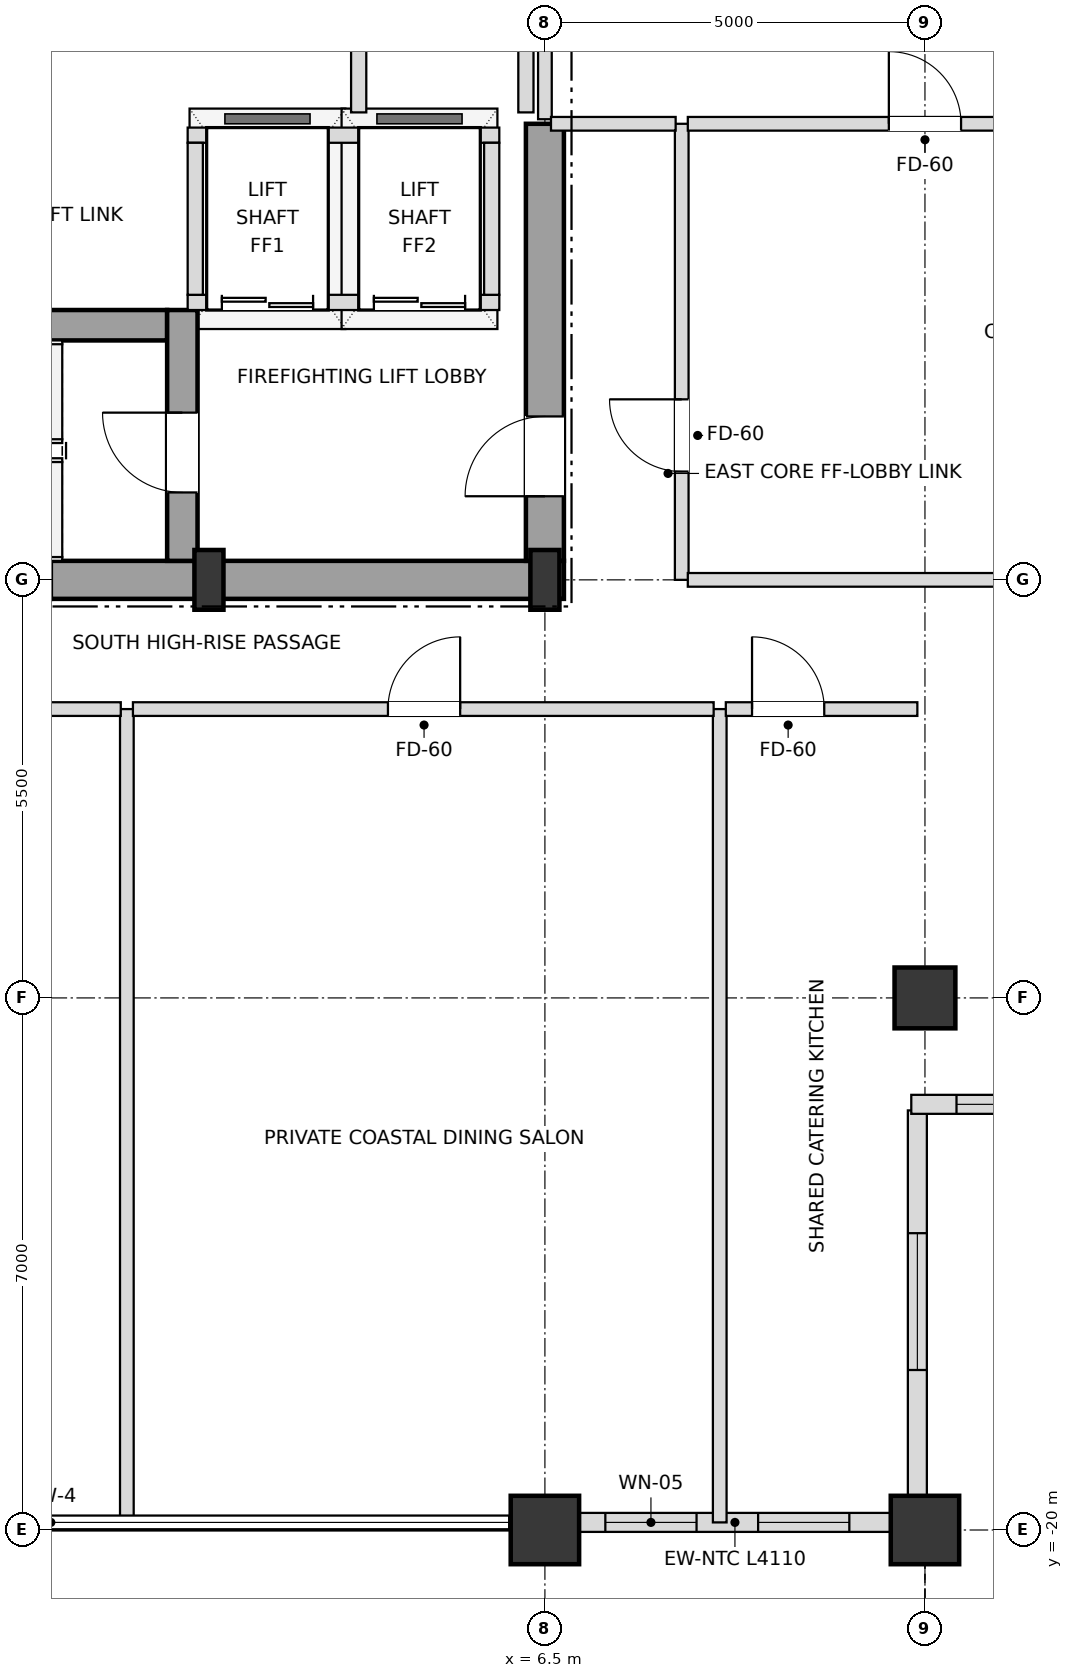
"""IFC4 building model, lengths in metres.
Left out: names, types, materials, properties, quantities, classifications, styles, units other than length and angle.
Written with IfcOpenShell. Run it as: python <this file> out.ifc"""

import sys

from ifc_helpers import new_model, si_unit, direction, frame, frame_2d, origin, origin_2d, place, context, subcontext, project, spatial, rectangle, i_section, extrude, element, fill, save


model = new_model("IFC4")
c1 = context("Model", 3, precision=1e-05, world=origin(), true_north=direction((0.0, 1.0)))
c2 = subcontext(c1, "Body", "Model", "MODEL_VIEW")
j1 = project(units=[si_unit("LENGTHUNIT", "METRE"), si_unit("PLANEANGLEUNIT", "RADIAN")], contexts=[c1])
p1 = place(None, origin())
s1 = spatial("IfcSite", under=j1, at=p1, CompositionType="ELEMENT")
p2 = place(p1, origin())
s2 = spatial("IfcBuilding", under=s1, at=p2, CompositionType="ELEMENT")
p3 = place(p2, frame((0.0, 0.0, 272.7)))
s3 = spatial("IfcBuildingStorey", under=s2, at=p3, CompositionType="ELEMENT", Elevation=272.7)
for number, where, z_axis, x_axis in (
    (1, (2.08, -7.5, 0.0), (0.0, 0.0, 1.0), (1.0, 0.0, 0.0)),
    (2, (6.5, -7.5, 0.0), (0.0, 0.0, 1.0), (1.0, 0.0, 0.0)),
):
    element("IfcColumn", number, at=place(p3, frame(where, z_axis=z_axis, x_axis=x_axis)), inside=s3, PredefinedType="COLUMN", context=c2, shape_type="SweptSolid", body=[
        extrude(i_section(OverallWidth=0.382, OverallDepth=0.786, WebThickness=0.02, FlangeThickness=0.033, at=origin_2d()), origin(), (0.0, 0.0, 1.0), 3.6),
    ])
for number, where, z_axis, x_axis in (
    (3, (6.5, -20.0, 0.0), (0.0, 0.0, 1.0), (1.0, 0.0, 0.0)),
    (4, (11.5, -20.0, 0.0), (0.0, 0.0, 1.0), (1.0, 0.0, 0.0)),
):
    element("IfcColumn", number, at=place(p3, frame(where, z_axis=z_axis, x_axis=x_axis)), inside=s3, PredefinedType="USERDEFINED", context=c2, shape_type="SweptSolid", body=[
        extrude(rectangle(XDim=0.9, YDim=0.9, at=origin_2d()), origin(), (0.0, 0.0, 1.0), 3.6),
    ])
p4 = place(p3, frame((11.5, -13.0, 0.0), z_axis=(0.0, 0.0, 1.0), x_axis=(1.0, 0.0, 0.0)))
e5 = element("IfcColumn", 5, at=p4, inside=s3, PredefinedType="COLUMN", context=c2, shape_type="SweptSolid", body=[
    extrude(rectangle(XDim=0.8, YDim=0.8, at=origin_2d()), origin(), (0.0, 0.0, 1.0), 3.6),
])
p5 = place(p3, frame((6.945, -19.9, 0.0), z_axis=(0.0, 0.0, 1.0), x_axis=(1.0, 0.0, 0.0)))
e6 = element("IfcWall", 6, at=p5, inside=s3, PredefinedType="SOLIDWALL", context=c2, shape_type="SweptSolid", body=[
    extrude(rectangle(XDim=4.11, YDim=0.25, at=frame_2d((2.055, 0.0))), origin(), (0.0, 0.0, 1.0), 2.748),
])
p6 = place(p5, frame((0.35, 0.0, 0.72)))
e7 = element("IfcOpeningElement", 7, at=p6, cuts=e6, PredefinedType="OPENING", context=c2, shape_type="SweptSolid", body=[
    extrude(rectangle(XDim=1.2, YDim=1.68, at=frame_2d((0.6, 0.84))), frame((0.0, 0.135, 0.0), z_axis=(0.0, -1.0, 0.0), x_axis=(1.0, 0.0, 0.0)), (0.0, 0.0, 1.0), 0.27),
])
p7 = place(p5, frame((2.36, 0.0, 0.72)))
e8 = element("IfcOpeningElement", 8, at=p7, cuts=e6, PredefinedType="OPENING", context=c2, shape_type="SweptSolid", body=[
    extrude(rectangle(XDim=1.2, YDim=1.68, at=frame_2d((0.6, 0.84))), frame((0.0, 0.135, 0.0), z_axis=(0.0, -1.0, 0.0), x_axis=(1.0, 0.0, 0.0)), (0.0, 0.0, 1.0), 0.27),
])
p8 = place(p3, frame((11.4, -19.82, 0.0), z_axis=(0.0, 0.0, 1.0), x_axis=(0.0, 1.0, 0.0)))
e9 = element("IfcWall", 9, at=p8, inside=s3, PredefinedType="SOLIDWALL", context=c2, shape_type="SweptSolid", body=[
    extrude(rectangle(XDim=5.34, YDim=0.25, at=frame_2d((2.67, 0.0))), origin(), (0.0, 0.0, 1.0), 2.748),
])
p9 = place(p8, frame((1.925, 0.0, 0.72)))
e10 = element("IfcOpeningElement", 10, at=p9, cuts=e9, PredefinedType="OPENING", context=c2, shape_type="SweptSolid", body=[
    extrude(rectangle(XDim=1.8, YDim=1.68, at=frame_2d((0.9, 0.84))), frame((0.0, 0.135, 0.0), z_axis=(0.0, -1.0, 0.0), x_axis=(1.0, 0.0, 0.0)), (0.0, 0.0, 1.0), 0.27),
])
p10 = place(p3, frame((11.32, -14.4, 0.0), z_axis=(0.0, 0.0, 1.0), x_axis=(1.0, 0.0, 0.0)))
e11 = element("IfcWall", 11, at=p10, inside=s3, PredefinedType="SOLIDWALL", context=c2, shape_type="SweptSolid", body=[
    extrude(rectangle(XDim=5.66, YDim=0.25, at=frame_2d((2.83, 0.0))), origin(), (0.0, 0.0, 1.0), 2.748),
])
p11 = place(p10, frame((0.595, 0.0, 0.72)))
e12 = element("IfcOpeningElement", 12, at=p11, cuts=e11, PredefinedType="OPENING", context=c2, shape_type="SweptSolid", body=[
    extrude(rectangle(XDim=1.8, YDim=1.68, at=frame_2d((0.9, 0.84))), frame((0.0, 0.135, 0.0), z_axis=(0.0, -1.0, 0.0), x_axis=(1.0, 0.0, 0.0)), (0.0, 0.0, 1.0), 0.27),
])
p12 = place(p10, frame((3.265, 0.0, 0.72)))
e13 = element("IfcOpeningElement", 13, at=p12, cuts=e11, PredefinedType="OPENING", context=c2, shape_type="SweptSolid", body=[
    extrude(rectangle(XDim=1.8, YDim=1.68, at=frame_2d((0.9, 0.84))), frame((0.0, 0.135, 0.0), z_axis=(0.0, -1.0, 0.0), x_axis=(1.0, 0.0, 0.0)), (0.0, 0.0, 1.0), 0.27),
])
p13 = place(p3, frame((0.0, -7.5, 0.0), z_axis=(0.0, 0.0, 1.0), x_axis=(1.0, 0.0, 0.0)))
e14 = element("IfcWall", 14, at=p13, inside=s3, PredefinedType="SHEAR", context=c2, shape_type="SweptSolid", body=[
    extrude(rectangle(XDim=6.75, YDim=0.5, at=frame_2d((3.375, 0.0))), origin(), (0.0, 0.0, 1.0), 3.38),
])
p14 = place(p3, frame((6.5, -7.25, 0.0), z_axis=(0.0, 0.0, 1.0), x_axis=(0.0, 1.0, 0.0)))
e15 = element("IfcWall", 15, at=p14, inside=s3, PredefinedType="SHEAR", context=c2, shape_type="SweptSolid", body=[
    extrude(rectangle(XDim=5.75, YDim=0.5, at=frame_2d((2.875, 0.0))), origin(), (0.0, 0.0, 1.0), 3.38),
])
p15 = place(p14, frame((0.85, 0.0, 0.0)))
e16 = element("IfcOpeningElement", 16, at=p15, cuts=e15, PredefinedType="OPENING", context=c2, shape_type="SweptSolid", body=[
    extrude(rectangle(XDim=1.05, YDim=2.15, at=frame_2d((0.525, 1.075))), frame((0.0, 0.26, 0.0), z_axis=(0.0, -1.0, 0.0), x_axis=(1.0, 0.0, 0.0)), (0.0, 0.0, 1.0), 0.52),
])
p16 = place(p3, frame((-6.25, -4.15, 0.0), z_axis=(0.0, 0.0, 1.0), x_axis=(1.0, 0.0, 0.0)))
e17 = element("IfcWall", 17, at=p16, inside=s3, PredefinedType="SHEAR", context=c2, shape_type="SweptSolid", body=[
    extrude(rectangle(XDim=7.78, YDim=0.4, at=frame_2d((3.89, 0.0))), origin(), (0.0, 0.0, 1.0), 3.38),
])
p17 = place(p3, frame((1.73, -7.25, 0.0), z_axis=(0.0, 0.0, 1.0), x_axis=(0.0, 1.0, 0.0)))
e18 = element("IfcWall", 18, at=p17, inside=s3, PredefinedType="SHEAR", context=c2, shape_type="SweptSolid", body=[
    extrude(rectangle(XDim=3.3, YDim=0.4, at=frame_2d((1.65, 0.0))), origin(), (0.0, 0.0, 1.0), 3.38),
])
p18 = place(p17, frame((0.9, 0.0, 0.0)))
e19 = element("IfcOpeningElement", 19, at=p18, cuts=e18, PredefinedType="OPENING", context=c2, shape_type="SweptSolid", body=[
    extrude(rectangle(XDim=1.05, YDim=2.15, at=frame_2d((0.525, 1.075))), frame((0.0, 0.21, 0.0), z_axis=(0.0, -1.0, 0.0), x_axis=(1.0, 0.0, 0.0)), (0.0, 0.0, 1.0), 0.42),
])
p19 = place(p3, frame((1.8, -3.85, 0.0), z_axis=(0.0, 0.0, 1.0), x_axis=(1.0, 0.0, 0.0)))
e20 = element("IfcWall", 20, at=p19, inside=s3, PredefinedType="SOLIDWALL", context=c2, shape_type="SweptSolid", body=[
    extrude(rectangle(XDim=4.1, YDim=0.2, at=frame_2d((2.05, 0.0))), origin(), (0.0, 0.0, 1.0), 3.38),
])
p20 = place(p19, frame((0.45, 0.0, 0.0)))
e21 = element("IfcOpeningElement", 21, at=p20, cuts=e20, PredefinedType="OPENING", context=c2, shape_type="SweptSolid", body=[
    extrude(rectangle(XDim=1.2, YDim=2.2, at=frame_2d((0.6, 1.1))), frame((0.0, 0.11, 0.0), z_axis=(0.0, -1.0, 0.0), x_axis=(1.0, 0.0, 0.0)), (0.0, 0.0, 1.0), 0.22),
])
p21 = place(p19, frame((2.45, 0.0, 0.0)))
e22 = element("IfcOpeningElement", 22, at=p21, cuts=e20, PredefinedType="OPENING", context=c2, shape_type="SweptSolid", body=[
    extrude(rectangle(XDim=1.2, YDim=2.2, at=frame_2d((0.6, 1.1))), frame((0.0, 0.11, 0.0), z_axis=(0.0, -1.0, 0.0), x_axis=(1.0, 0.0, 0.0)), (0.0, 0.0, 1.0), 0.22),
])
p22 = place(p3, frame((1.8, -1.65, 0.0), z_axis=(0.0, 0.0, 1.0), x_axis=(1.0, 0.0, 0.0)))
e23 = element("IfcWall", 23, at=p22, inside=s3, PredefinedType="SOLIDWALL", context=c2, shape_type="SweptSolid", body=[
    extrude(rectangle(XDim=4.1, YDim=0.2, at=frame_2d((2.05, 0.0))), origin(), (0.0, 0.0, 1.0), 3.38),
])
for number, where, z_axis, x_axis in (
    (24, (1.9, -3.75, 0.0), (0.0, 0.0, 1.0), (0.0, 1.0, 0.0)),
    (25, (5.8, -3.75, 0.0), (0.0, 0.0, 1.0), (0.0, 1.0, 0.0)),
):
    element("IfcWall", number, at=place(p3, frame(where, z_axis=z_axis, x_axis=x_axis)), inside=s3, PredefinedType="SOLIDWALL", context=c2, shape_type="SweptSolid", body=[
        extrude(rectangle(XDim=2.0, YDim=0.2, at=frame_2d((1.0, 0.0))), origin(), (0.0, 0.0, 1.0), 3.38),
    ])
p23 = place(p3, frame((1.0, -19.9, 0.0), z_axis=(0.0, 0.0, 1.0), x_axis=(0.0, 1.0, 0.0)))
e26 = element("IfcWall", 26, at=p23, inside=s3, PredefinedType="PARTITIONING", context=c2, shape_type="SweptSolid", body=[
    extrude(rectangle(XDim=10.7, YDim=0.18, at=frame_2d((5.35, 0.0))), origin(), (0.0, 0.0, 1.0), 3.018),
])
p24 = place(p3, frame((4.05, -1.35, 0.0), z_axis=(0.0, 0.0, 1.0), x_axis=(0.0, 1.0, 0.0)))
e27 = element("IfcWall", 27, at=p24, inside=s3, PredefinedType="SOLIDWALL", context=c2, shape_type="SweptSolid", body=[
    extrude(rectangle(XDim=5.15, YDim=0.2, at=frame_2d((2.575, 0.0))), origin(), (0.0, 0.0, 1.0), 3.38),
])
p25 = place(p24, frame((1.095, 0.0, 0.0)))
e28 = element("IfcOpeningElement", 28, at=p25, cuts=e27, PredefinedType="OPENING", context=c2, shape_type="SweptSolid", body=[
    extrude(rectangle(XDim=0.95, YDim=2.15, at=frame_2d((0.475, 1.075))), frame((0.0, 0.11, 0.0), z_axis=(0.0, -1.0, 0.0), x_axis=(1.0, 0.0, 0.0)), (0.0, 0.0, 1.0), 0.22),
])
p26 = place(p24, frame((3.675, 0.0, 0.0)))
e29 = element("IfcOpeningElement", 29, at=p26, cuts=e27, PredefinedType="OPENING", context=c2, shape_type="SweptSolid", body=[
    extrude(rectangle(XDim=0.95, YDim=2.15, at=frame_2d((0.475, 1.075))), frame((0.0, 0.11, 0.0), z_axis=(0.0, -1.0, 0.0), x_axis=(1.0, 0.0, 0.0)), (0.0, 0.0, 1.0), 0.22),
])
p27 = place(p3, frame((6.25, -1.35, 0.0), z_axis=(0.0, 0.0, 1.0), x_axis=(0.0, 1.0, 0.0)))
e30 = element("IfcWall", 30, at=p27, inside=s3, PredefinedType="SOLIDWALL", context=c2, shape_type="SweptSolid", body=[
    extrude(rectangle(XDim=5.15, YDim=0.2, at=frame_2d((2.575, 0.0))), origin(), (0.0, 0.0, 1.0), 3.38),
])
p28 = place(p3, frame((6.5, -1.44, 0.0), z_axis=(0.0, 0.0, 1.0), x_axis=(0.0, 1.0, 0.0)))
e31 = element("IfcWall", 31, at=p28, inside=s3, PredefinedType="PARTITIONING", context=c2, shape_type="SweptSolid", body=[
    extrude(rectangle(XDim=5.33, YDim=0.18, at=frame_2d((2.665, 0.0))), origin(), (0.0, 0.0, 1.0), 2.826),
])
p29 = place(p3, frame((8.3, -7.5, 0.0), z_axis=(0.0, 0.0, 1.0), x_axis=(0.0, 1.0, 0.0)))
e32 = element("IfcWall", 32, at=p29, inside=s3, PredefinedType="PARTITIONING", context=c2, shape_type="SweptSolid", body=[
    extrude(rectangle(XDim=6.0, YDim=0.18, at=frame_2d((3.0, 0.0))), origin(), (0.0, 0.0, 1.0), 3.38),
])
p30 = place(p29, frame((1.425, 0.0, 0.0)))
e33 = element("IfcOpeningElement", 33, at=p30, cuts=e32, PredefinedType="OPENING", context=c2, shape_type="SweptSolid", body=[
    extrude(rectangle(XDim=0.95, YDim=2.15, at=frame_2d((0.475, 1.075))), frame((0.0, 0.1, 0.0), z_axis=(0.0, -1.0, 0.0), x_axis=(1.0, 0.0, 0.0)), (0.0, 0.0, 1.0), 0.2),
])
p31 = place(p3, frame((8.8, -19.9, 0.0), z_axis=(0.0, 0.0, 1.0), x_axis=(0.0, 1.0, 0.0)))
e34 = element("IfcWall", 34, at=p31, inside=s3, PredefinedType="PARTITIONING", context=c2, shape_type="SweptSolid", body=[
    extrude(rectangle(XDim=10.7, YDim=0.18, at=frame_2d((5.35, 0.0))), origin(), (0.0, 0.0, 1.0), 2.826),
])
p32 = place(p3, frame((-6.42, -9.2, 0.0), z_axis=(0.0, 0.0, 1.0), x_axis=(1.0, 0.0, 0.0)))
e35 = element("IfcWall", 35, at=p32, inside=s3, PredefinedType="PARTITIONING", context=c2, shape_type="SweptSolid", body=[
    extrude(rectangle(XDim=7.34, YDim=0.18, at=frame_2d((3.67, 0.0))), origin(), (0.0, 0.0, 1.0), 3.38),
])
p33 = place(p32, frame((3.205, 0.0, 0.0)))
e36 = element("IfcOpeningElement", 36, at=p33, cuts=e35, PredefinedType="OPENING", context=c2, shape_type="SweptSolid", body=[
    extrude(rectangle(XDim=0.95, YDim=2.15, at=frame_2d((0.475, 1.075))), frame((0.0, 0.1, 0.0), z_axis=(0.0, -1.0, 0.0), x_axis=(1.0, 0.0, 0.0)), (0.0, 0.0, 1.0), 0.2),
])
p34 = place(p3, frame((1.08, -9.2, 0.0), z_axis=(0.0, 0.0, 1.0), x_axis=(1.0, 0.0, 0.0)))
e37 = element("IfcWall", 37, at=p34, inside=s3, PredefinedType="PARTITIONING", context=c2, shape_type="SweptSolid", body=[
    extrude(rectangle(XDim=7.64, YDim=0.18, at=frame_2d((3.82, 0.0))), origin(), (0.0, 0.0, 1.0), 2.826),
])
p35 = place(p34, frame((3.355, 0.0, 0.0)))
e38 = element("IfcOpeningElement", 38, at=p35, cuts=e37, PredefinedType="OPENING", context=c2, shape_type="SweptSolid", body=[
    extrude(rectangle(XDim=0.95, YDim=2.15, at=frame_2d((0.475, 1.075))), frame((0.0, 0.1, 0.0), z_axis=(0.0, -1.0, 0.0), x_axis=(1.0, 0.0, 0.0)), (0.0, 0.0, 1.0), 0.2),
])
p36 = place(p3, frame((8.88, -9.2, 0.0), z_axis=(0.0, 0.0, 1.0), x_axis=(1.0, 0.0, 0.0)))
e39 = element("IfcWall", 39, at=p36, inside=s3, PredefinedType="PARTITIONING", context=c2, shape_type="SweptSolid", body=[
    extrude(rectangle(XDim=2.52, YDim=0.18, at=frame_2d((1.26, 0.0))), origin(), (0.0, 0.0, 1.0), 3.38),
])
p37 = place(p36, frame((0.345, 0.0, 0.0)))
e40 = element("IfcOpeningElement", 40, at=p37, cuts=e39, PredefinedType="OPENING", context=c2, shape_type="SweptSolid", body=[
    extrude(rectangle(XDim=0.95, YDim=2.15, at=frame_2d((0.475, 1.075))), frame((0.0, 0.1, 0.0), z_axis=(0.0, -1.0, 0.0), x_axis=(1.0, 0.0, 0.0)), (0.0, 0.0, 1.0), 0.2),
])
p38 = place(p3, frame((8.38, -7.5, 0.0), z_axis=(0.0, 0.0, 1.0), x_axis=(1.0, 0.0, 0.0)))
e41 = element("IfcWall", 41, at=p38, inside=s3, PredefinedType="PARTITIONING", context=c2, shape_type="SweptSolid", body=[
    extrude(rectangle(XDim=8.52, YDim=0.18, at=frame_2d((4.26, 0.0))), origin(), (0.0, 0.0, 1.0), 2.826),
])
p39 = place(p3, frame((6.58, -1.5, 0.0), z_axis=(0.0, 0.0, 1.0), x_axis=(1.0, 0.0, 0.0)))
e42 = element("IfcWall", 42, at=p39, inside=s3, PredefinedType="PARTITIONING", context=c2, shape_type="SweptSolid", body=[
    extrude(rectangle(XDim=1.64, YDim=0.18, at=frame_2d((0.82, 0.0))), origin(), (0.0, 0.0, 1.0), 3.38),
])
p40 = place(p3, frame((8.38, -1.5, 0.0), z_axis=(0.0, 0.0, 1.0), x_axis=(1.0, 0.0, 0.0)))
e43 = element("IfcWall", 43, at=p40, inside=s3, PredefinedType="PARTITIONING", context=c2, shape_type="SweptSolid", body=[
    extrude(rectangle(XDim=8.44, YDim=0.18, at=frame_2d((4.22, 0.0))), origin(), (0.0, 0.0, 1.0), 3.018),
])
p41 = place(p40, frame((2.645, 0.0, 0.0)))
e44 = element("IfcOpeningElement", 44, at=p41, cuts=e43, PredefinedType="OPENING", context=c2, shape_type="SweptSolid", body=[
    extrude(rectangle(XDim=0.95, YDim=2.15, at=frame_2d((0.475, 1.075))), frame((0.0, 0.1, 0.0), z_axis=(0.0, -1.0, 0.0), x_axis=(1.0, 0.0, 0.0)), (0.0, 0.0, 1.0), 0.2),
])
p42 = place(p6, origin())
e45 = element("IfcWindow", 45, at=p42, inside=s3, PartitioningType="SINGLE_PANEL", PredefinedType="WINDOW", context=c2, shape_type="SweptSolid", body=[
    extrude(rectangle(XDim=1.2, YDim=1.68, at=frame_2d((0.6, 0.84))), frame((0.0, 0.03, 0.0), z_axis=(0.0, -1.0, 0.0), x_axis=(1.0, 0.0, 0.0)), (0.0, 0.0, 1.0), 0.06),
])
fill(e7, e45)
p43 = place(p7, origin())
e46 = element("IfcWindow", 46, at=p43, inside=s3, PartitioningType="SINGLE_PANEL", PredefinedType="WINDOW", context=c2, shape_type="SweptSolid", body=[
    extrude(rectangle(XDim=1.2, YDim=1.68, at=frame_2d((0.6, 0.84))), frame((0.0, 0.03, 0.0), z_axis=(0.0, -1.0, 0.0), x_axis=(1.0, 0.0, 0.0)), (0.0, 0.0, 1.0), 0.06),
])
fill(e8, e46)
p44 = place(p9, origin())
e47 = element("IfcWindow", 47, at=p44, inside=s3, PartitioningType="SINGLE_PANEL", PredefinedType="WINDOW", context=c2, shape_type="SweptSolid", body=[
    extrude(rectangle(XDim=1.8, YDim=1.68, at=frame_2d((0.9, 0.84))), frame((0.0, 0.03, 0.0), z_axis=(0.0, -1.0, 0.0), x_axis=(1.0, 0.0, 0.0)), (0.0, 0.0, 1.0), 0.06),
])
fill(e10, e47)
p45 = place(p11, origin())
e48 = element("IfcWindow", 48, at=p45, inside=s3, PartitioningType="SINGLE_PANEL", PredefinedType="WINDOW", context=c2, shape_type="SweptSolid", body=[
    extrude(rectangle(XDim=1.8, YDim=1.68, at=frame_2d((0.9, 0.84))), frame((0.0, 0.03, 0.0), z_axis=(0.0, -1.0, 0.0), x_axis=(1.0, 0.0, 0.0)), (0.0, 0.0, 1.0), 0.06),
])
fill(e12, e48)
p46 = place(p15, origin())
e49 = element("IfcDoor", 49, at=p46, inside=s3, OperationType="SINGLE_SWING_LEFT", PredefinedType="DOOR", context=c2, shape_type="SweptSolid", body=[
    extrude(rectangle(XDim=1.05, YDim=2.15, at=frame_2d((0.525, 1.075))), frame((0.0, 0.025, 0.0), z_axis=(0.0, -1.0, 0.0), x_axis=(1.0, 0.0, 0.0)), (0.0, 0.0, 1.0), 0.05),
])
fill(e16, e49)
p47 = place(p18, origin())
e50 = element("IfcDoor", 50, at=p47, inside=s3, OperationType="SINGLE_SWING_RIGHT", PredefinedType="DOOR", context=c2, shape_type="SweptSolid", body=[
    extrude(rectangle(XDim=1.05, YDim=2.15, at=frame_2d((0.525, 1.075))), frame((0.0, 0.025, 0.0), z_axis=(0.0, -1.0, 0.0), x_axis=(1.0, 0.0, 0.0)), (0.0, 0.0, 1.0), 0.05),
])
fill(e19, e50)
p48 = place(p20, origin())
e51 = element("IfcDoor", 51, at=p48, inside=s3, OperationType="DOUBLE_DOOR_SLIDING", PredefinedType="DOOR", context=c2, shape_type="SweptSolid", body=[
    extrude(rectangle(XDim=1.2, YDim=2.2, at=frame_2d((0.6, 1.1))), frame((0.0, 0.025, 0.0), z_axis=(0.0, -1.0, 0.0), x_axis=(1.0, 0.0, 0.0)), (0.0, 0.0, 1.0), 0.05),
])
fill(e21, e51)
p49 = place(p21, origin())
e52 = element("IfcDoor", 52, at=p49, inside=s3, OperationType="DOUBLE_DOOR_SLIDING", PredefinedType="DOOR", context=c2, shape_type="SweptSolid", body=[
    extrude(rectangle(XDim=1.2, YDim=2.2, at=frame_2d((0.6, 1.1))), frame((0.0, 0.025, 0.0), z_axis=(0.0, -1.0, 0.0), x_axis=(1.0, 0.0, 0.0)), (0.0, 0.0, 1.0), 0.05),
])
fill(e22, e52)
p50 = place(p35, origin())
e53 = element("IfcDoor", 53, at=p50, inside=s3, OperationType="SINGLE_SWING_RIGHT", PredefinedType="DOOR", context=c2, shape_type="SweptSolid", body=[
    extrude(rectangle(XDim=0.95, YDim=2.15, at=frame_2d((0.475, 1.075))), frame((0.0, 0.025, 0.0), z_axis=(0.0, -1.0, 0.0), x_axis=(1.0, 0.0, 0.0)), (0.0, 0.0, 1.0), 0.05),
])
fill(e38, e53)
p51 = place(p37, origin())
e54 = element("IfcDoor", 54, at=p51, inside=s3, OperationType="SINGLE_SWING_LEFT", PredefinedType="DOOR", context=c2, shape_type="SweptSolid", body=[
    extrude(rectangle(XDim=0.95, YDim=2.15, at=frame_2d((0.475, 1.075))), frame((0.0, 0.025, 0.0), z_axis=(0.0, -1.0, 0.0), x_axis=(1.0, 0.0, 0.0)), (0.0, 0.0, 1.0), 0.05),
])
fill(e40, e54)
p52 = place(p30, origin())
e55 = element("IfcDoor", 55, at=p52, inside=s3, OperationType="SINGLE_SWING_RIGHT", PredefinedType="DOOR", context=c2, shape_type="SweptSolid", body=[
    extrude(rectangle(XDim=0.95, YDim=2.15, at=frame_2d((0.475, 1.075))), frame((0.0, 0.025, 0.0), z_axis=(0.0, -1.0, 0.0), x_axis=(1.0, 0.0, 0.0)), (0.0, 0.0, 1.0), 0.05),
])
fill(e33, e55)
p53 = place(p41, origin())
e56 = element("IfcDoor", 56, at=p53, inside=s3, OperationType="SINGLE_SWING_LEFT", PredefinedType="DOOR", context=c2, shape_type="SweptSolid", body=[
    extrude(rectangle(XDim=0.95, YDim=2.15, at=frame_2d((0.475, 1.075))), frame((0.0, 0.025, 0.0), z_axis=(0.0, -1.0, 0.0), x_axis=(1.0, 0.0, 0.0)), (0.0, 0.0, 1.0), 0.05),
])
fill(e44, e56)
save(model, sys.argv[1])
